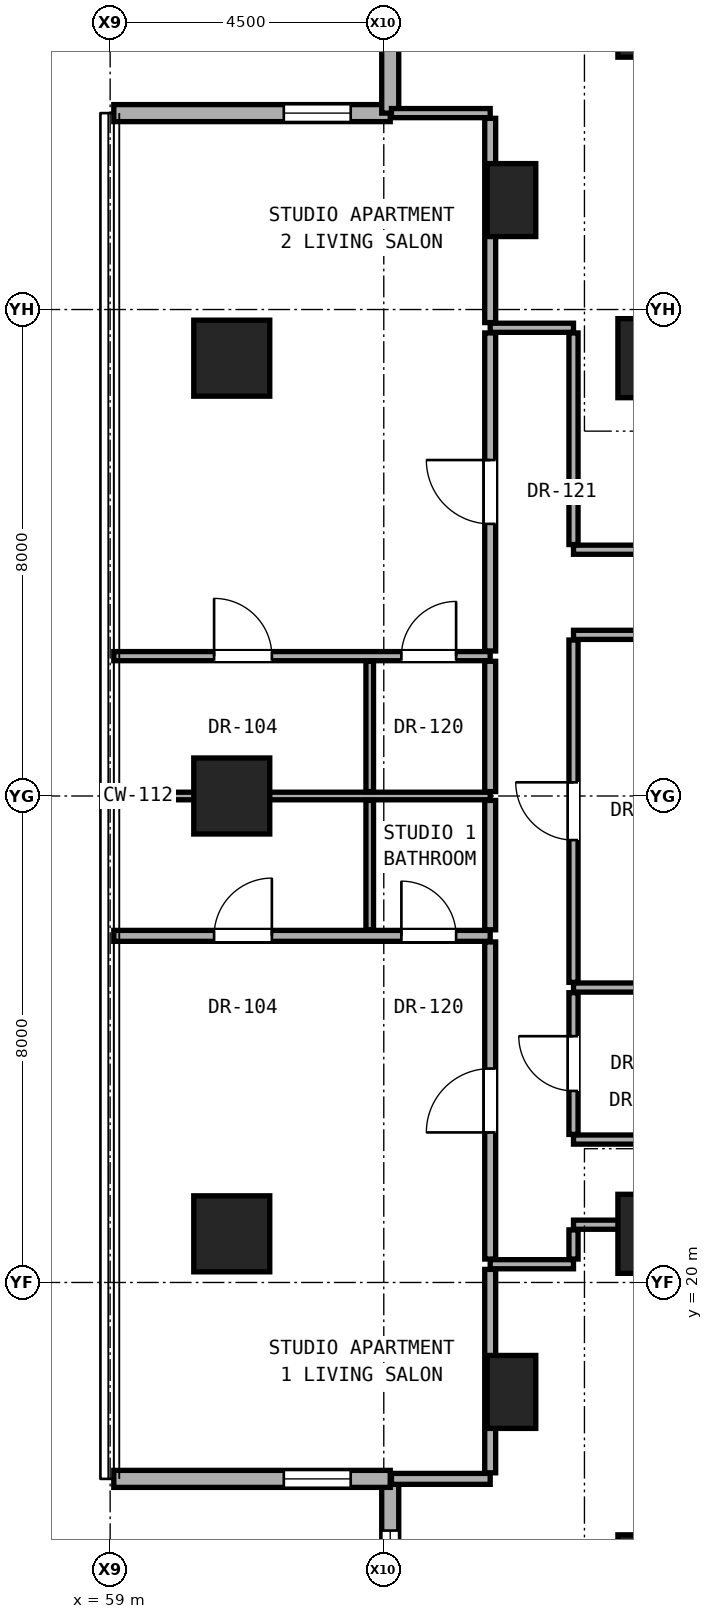
"""IFC4 building model, lengths in metres.
Left out: names, types, materials, properties, quantities, classifications, styles, units other than length and angle.
Written with IfcOpenShell. Run it as: python <this file> out.ifc"""

import sys

from ifc_helpers import new_model, si_unit, direction, frame, frame_2d, origin, origin_2d, place, context, subcontext, project, spatial, rectangle, hollow_rectangle, extrude, element, fill, save


model = new_model("IFC4")
c1 = context("Model", 3, precision=1e-05, world=origin(), true_north=direction((0.0, 1.0)))
c2 = subcontext(c1, "Body", "Model", "MODEL_VIEW")
j1 = project(units=[si_unit("LENGTHUNIT", "METRE"), si_unit("PLANEANGLEUNIT", "RADIAN")], contexts=[c1])
p1 = place(None, origin())
s1 = spatial("IfcSite", under=j1, at=p1, CompositionType="ELEMENT")
p2 = place(p1, origin())
s2 = spatial("IfcBuilding", under=s1, at=p2, CompositionType="ELEMENT")
p3 = place(p2, frame((0.0, 0.0, 52.1)))
s3 = spatial("IfcBuildingStorey", under=s2, at=p3, CompositionType="ELEMENT", Elevation=52.1)
for number, where, z_axis, x_axis in (
    (1, (68.0, 15.2, 0.0), (0.0, 0.0, 1.0), (1.0, 0.0, 0.0)),
    (2, (68.0, 20.8, 0.0), (0.0, 0.0, 1.0), (1.0, 0.0, 0.0)),
    (3, (68.0, 35.2, 0.0), (0.0, 0.0, 1.0), (1.0, 0.0, 0.0)),
    (4, (68.0, 40.8, 0.0), (0.0, 0.0, 1.0), (1.0, 0.0, 0.0)),
):
    element("IfcColumn", number, at=place(p3, frame(where, z_axis=z_axis, x_axis=x_axis)), inside=s3, PredefinedType="COLUMN", context=c2, shape_type="SweptSolid", body=[
        extrude(rectangle(XDim=1.3, YDim=1.3, at=origin_2d()), origin(), (0.0, 0.0, 1.0), 3.3),
    ])
for number, where, z_axis, x_axis in (
    (5, (61.0, 20.8, 0.0), (0.0, 0.0, 1.0), (1.0, 0.0, 0.0)),
    (6, (61.0, 28.0, 0.0), (0.0, 0.0, 1.0), (1.0, 0.0, 0.0)),
    (7, (61.0, 35.2, 0.0), (0.0, 0.0, 1.0), (1.0, 0.0, 0.0)),
):
    element("IfcColumn", number, at=place(p3, frame(where, z_axis=z_axis, x_axis=x_axis)), inside=s3, PredefinedType="COLUMN", context=c2, shape_type="SweptSolid", body=[
        extrude(hollow_rectangle(XDim=1.25, YDim=1.25, WallThickness=0.07, at=origin_2d()), origin(), (0.0, 0.0, 1.0), 3.3),
    ])
for number, where, z_axis, x_axis in (
    (8, (65.6, 18.2, 0.0), (0.0, 0.0, 1.0), (1.0, 0.0, 0.0)),
    (9, (65.6, 37.8, 0.0), (0.0, 0.0, 1.0), (1.0, 0.0, 0.0)),
):
    element("IfcColumn", number, at=place(p3, frame(where, z_axis=z_axis, x_axis=x_axis)), inside=s3, PredefinedType="PILASTER", context=c2, shape_type="SweptSolid", body=[
        extrude(rectangle(XDim=0.8, YDim=1.2, at=origin_2d()), origin(), (0.0, 0.0, 1.0), 3.3),
    ])
p4 = place(p3, frame((63.606, 16.77, 0.0), z_axis=(0.0, 0.0, 1.0), x_axis=(0.0, -1.0, 0.0)))
e10 = element("IfcWall", 10, at=p4, inside=s3, PredefinedType="SOLIDWALL", context=c2, shape_type="SweptSolid", body=[
    extrude(rectangle(XDim=4.546, YDim=0.28, at=frame_2d((2.273, 0.0))), origin(), (0.0, 0.0, 1.0), 3.04),
])
p5 = place(p4, frame((0.85, 0.0, 0.79)))
e11 = element("IfcOpeningElement", 11, at=p5, cuts=e10, PredefinedType="OPENING", context=c2, shape_type="SweptSolid", body=[
    extrude(rectangle(XDim=1.2, YDim=2.1, at=frame_2d((0.6, 1.05))), frame((0.0, 0.15, 0.0), z_axis=(0.0, -1.0, 0.0), x_axis=(1.0, 0.0, 0.0)), (0.0, 0.0, 1.0), 0.3),
])
p6 = place(p3, frame((59.06, 16.77, 0.0), z_axis=(0.0, 0.0, 1.0), x_axis=(1.0, 0.0, 0.0)))
e12 = element("IfcWall", 12, at=p6, inside=s3, PredefinedType="SOLIDWALL", context=c2, shape_type="SweptSolid", body=[
    extrude(rectangle(XDim=4.546, YDim=0.28, at=frame_2d((2.273, 0.0))), origin(), (0.0, 0.0, 1.0), 3.04),
])
p7 = place(p6, frame((2.796, 0.0, 0.85)))
e13 = element("IfcOpeningElement", 13, at=p7, cuts=e12, PredefinedType="OPENING", context=c2, shape_type="SweptSolid", body=[
    extrude(rectangle(XDim=1.1, YDim=2.0, at=frame_2d((0.55, 1.0))), frame((0.0, 0.15, 0.0), z_axis=(0.0, -1.0, 0.0), x_axis=(1.0, 0.0, 0.0)), (0.0, 0.0, 1.0), 0.3),
])
p8 = place(p3, frame((63.606, 39.23, 0.0), z_axis=(0.0, 0.0, 1.0), x_axis=(-1.0, 0.0, 0.0)))
e14 = element("IfcWall", 14, at=p8, inside=s3, PredefinedType="SOLIDWALL", context=c2, shape_type="SweptSolid", body=[
    extrude(rectangle(XDim=4.546, YDim=0.28, at=frame_2d((2.273, 0.0))), origin(), (0.0, 0.0, 1.0), 3.04),
])
p9 = place(p8, frame((0.65, 0.0, 0.85)))
e15 = element("IfcOpeningElement", 15, at=p9, cuts=e14, PredefinedType="OPENING", context=c2, shape_type="SweptSolid", body=[
    extrude(rectangle(XDim=1.1, YDim=2.0, at=frame_2d((0.55, 1.0))), frame((0.0, 0.15, 0.0), z_axis=(0.0, -1.0, 0.0), x_axis=(1.0, 0.0, 0.0)), (0.0, 0.0, 1.0), 0.3),
])
p10 = place(p3, frame((63.606, 43.776, 0.0), z_axis=(0.0, 0.0, 1.0), x_axis=(0.0, -1.0, 0.0)))
e16 = element("IfcWall", 16, at=p10, inside=s3, PredefinedType="SOLIDWALL", context=c2, shape_type="SweptSolid", body=[
    extrude(rectangle(XDim=4.546, YDim=0.28, at=frame_2d((2.273, 0.0))), origin(), (0.0, 0.0, 1.0), 3.04),
])
p11 = place(p3, frame((63.626, 16.77, 0.0), z_axis=(0.0, 0.0, 1.0), x_axis=(1.0, 0.0, 0.0)))
e17 = element("IfcWall", 17, at=p11, inside=s3, PredefinedType="PARTITIONING", context=c2, shape_type="SweptSolid", body=[
    extrude(rectangle(XDim=1.624, YDim=0.18, at=frame_2d((0.812, 0.0))), origin(), (0.0, 0.0, 1.0), 3.06),
])
p12 = place(p3, frame((65.25, 20.3, 0.0), z_axis=(0.0, 0.0, 1.0), x_axis=(1.0, 0.0, 0.0)))
e18 = element("IfcWall", 18, at=p12, inside=s3, PredefinedType="PARTITIONING", context=c2, shape_type="SweptSolid", body=[
    extrude(rectangle(XDim=1.37, YDim=0.15, at=frame_2d((0.685, 0.0))), origin(), (0.0, 0.0, 1.0), 3.06),
])
p13 = place(p3, frame((66.62, 20.95, 0.0), z_axis=(0.0, 0.0, 1.0), x_axis=(1.0, 0.0, 0.0)))
e19 = element("IfcWall", 19, at=p13, inside=s3, PredefinedType="PARTITIONING", context=c2, shape_type="SweptSolid", body=[
    extrude(rectangle(XDim=1.06, YDim=0.15, at=frame_2d((0.53, 0.0))), origin(), (0.0, 0.0, 1.0), 2.452),
])
p14 = place(p3, frame((66.62, 22.35, 0.0), z_axis=(0.0, 0.0, 1.0), x_axis=(1.0, 0.0, 0.0)))
e20 = element("IfcWall", 20, at=p14, inside=s3, PredefinedType="PARTITIONING", context=c2, shape_type="SweptSolid", body=[
    extrude(rectangle(XDim=19.63, YDim=0.15, at=frame_2d((9.815, 0.0))), origin(), (0.0, 0.0, 1.0), 2.125),
])
p15 = place(p14, frame((8.129, 0.0, 0.0)))
e21 = element("IfcOpeningElement", 21, at=p15, cuts=e20, PredefinedType="OPENING", context=c2, shape_type="SweptSolid", body=[
    extrude(rectangle(XDim=0.85, YDim=2.01, at=frame_2d((0.425, 1.005))), frame((0.0, 0.085, 0.0), z_axis=(0.0, -1.0, 0.0), x_axis=(1.0, 0.0, 0.0)), (0.0, 0.0, 1.0), 0.17),
])
p16 = place(p3, frame((66.62, 24.85, 0.0), z_axis=(0.0, 0.0, 1.0), x_axis=(1.0, 0.0, 0.0)))
e22 = element("IfcWall", 22, at=p16, inside=s3, PredefinedType="PARTITIONING", context=c2, shape_type="SweptSolid", body=[
    extrude(rectangle(XDim=3.13, YDim=0.15, at=frame_2d((1.565, 0.0))), origin(), (0.0, 0.0, 1.0), 2.125),
])
p17 = place(p3, frame((59.06, 25.7, 0.0), z_axis=(0.0, 0.0, 1.0), x_axis=(1.0, 0.0, 0.0)))
e23 = element("IfcWall", 23, at=p17, inside=s3, PredefinedType="PARTITIONING", context=c2, shape_type="SweptSolid", body=[
    extrude(rectangle(XDim=6.19, YDim=0.18, at=frame_2d((3.095, 0.0))), origin(), (0.0, 0.0, 1.0), 2.196),
])
p18 = place(p17, frame((1.649, 0.0, 0.0)))
e24 = element("IfcOpeningElement", 24, at=p18, cuts=e23, PredefinedType="OPENING", context=c2, shape_type="SweptSolid", body=[
    extrude(rectangle(XDim=0.95, YDim=2.15, at=frame_2d((0.475, 1.075))), frame((0.0, 0.1, 0.0), z_axis=(0.0, -1.0, 0.0), x_axis=(1.0, 0.0, 0.0)), (0.0, 0.0, 1.0), 0.2),
])
p19 = place(p17, frame((4.729, 0.0, 0.0)))
e25 = element("IfcOpeningElement", 25, at=p19, cuts=e23, PredefinedType="OPENING", context=c2, shape_type="SweptSolid", body=[
    extrude(rectangle(XDim=0.9, YDim=2.1, at=frame_2d((0.45, 1.05))), frame((0.0, 0.1, 0.0), z_axis=(0.0, -1.0, 0.0), x_axis=(1.0, 0.0, 0.0)), (0.0, 0.0, 1.0), 0.2),
])
p20 = place(p3, frame((59.06, 28.0, 0.0), z_axis=(0.0, 0.0, 1.0), x_axis=(1.0, 0.0, 0.0)))
e26 = element("IfcWall", 26, at=p20, inside=s3, PredefinedType="PARTITIONING", context=c2, shape_type="SweptSolid", body=[
    extrude(rectangle(XDim=6.19, YDim=0.125, at=frame_2d((3.095, 0.0))), origin(), (0.0, 0.0, 1.0), 2.196),
])
p21 = place(p3, frame((59.06, 30.3, 0.0), z_axis=(0.0, 0.0, 1.0), x_axis=(1.0, 0.0, 0.0)))
e27 = element("IfcWall", 27, at=p21, inside=s3, PredefinedType="PARTITIONING", context=c2, shape_type="SweptSolid", body=[
    extrude(rectangle(XDim=6.19, YDim=0.15, at=frame_2d((3.095, 0.0))), origin(), (0.0, 0.0, 1.0), 2.196),
])
p22 = place(p21, frame((1.649, 0.0, 0.0)))
e28 = element("IfcOpeningElement", 28, at=p22, cuts=e27, PredefinedType="OPENING", context=c2, shape_type="SweptSolid", body=[
    extrude(rectangle(XDim=0.95, YDim=2.15, at=frame_2d((0.475, 1.075))), frame((0.0, 0.085, 0.0), z_axis=(0.0, -1.0, 0.0), x_axis=(1.0, 0.0, 0.0)), (0.0, 0.0, 1.0), 0.17),
])
p23 = place(p21, frame((4.729, 0.0, 0.0)))
e29 = element("IfcOpeningElement", 29, at=p23, cuts=e27, PredefinedType="OPENING", context=c2, shape_type="SweptSolid", body=[
    extrude(rectangle(XDim=0.9, YDim=2.1, at=frame_2d((0.45, 1.05))), frame((0.0, 0.085, 0.0), z_axis=(0.0, -1.0, 0.0), x_axis=(1.0, 0.0, 0.0)), (0.0, 0.0, 1.0), 0.17),
])
p24 = place(p3, frame((66.62, 30.65, 0.0), z_axis=(0.0, 0.0, 1.0), x_axis=(1.0, 0.0, 0.0)))
e30 = element("IfcWall", 30, at=p24, inside=s3, PredefinedType="PARTITIONING", context=c2, shape_type="SweptSolid", body=[
    extrude(rectangle(XDim=19.63, YDim=0.15, at=frame_2d((9.815, 0.0))), origin(), (0.0, 0.0, 1.0), 2.125),
])
p25 = place(p24, frame((3.855, 0.0, 0.0)))
e31 = element("IfcOpeningElement", 31, at=p25, cuts=e30, PredefinedType="OPENING", context=c2, shape_type="SweptSolid", body=[
    extrude(rectangle(XDim=0.85, YDim=2.01, at=frame_2d((0.425, 1.005))), frame((0.0, 0.085, 0.0), z_axis=(0.0, -1.0, 0.0), x_axis=(1.0, 0.0, 0.0)), (0.0, 0.0, 1.0), 0.17),
])
p26 = place(p24, frame((15.209, 0.0, 0.0)))
e32 = element("IfcOpeningElement", 32, at=p26, cuts=e30, PredefinedType="OPENING", context=c2, shape_type="SweptSolid", body=[
    extrude(rectangle(XDim=0.85, YDim=2.01, at=frame_2d((0.425, 1.005))), frame((0.0, 0.085, 0.0), z_axis=(0.0, -1.0, 0.0), x_axis=(1.0, 0.0, 0.0)), (0.0, 0.0, 1.0), 0.17),
])
p27 = place(p3, frame((66.62, 32.05, 0.0), z_axis=(0.0, 0.0, 1.0), x_axis=(1.0, 0.0, 0.0)))
e33 = element("IfcWall", 33, at=p27, inside=s3, PredefinedType="PARTITIONING", context=c2, shape_type="SweptSolid", body=[
    extrude(rectangle(XDim=2.18, YDim=0.15, at=frame_2d((1.09, 0.0))), origin(), (0.0, 0.0, 1.0), 2.125),
])
p28 = place(p3, frame((65.25, 35.7, 0.0), z_axis=(0.0, 0.0, 1.0), x_axis=(1.0, 0.0, 0.0)))
e34 = element("IfcWall", 34, at=p28, inside=s3, PredefinedType="PARTITIONING", context=c2, shape_type="SweptSolid", body=[
    extrude(rectangle(XDim=1.37, YDim=0.15, at=frame_2d((0.685, 0.0))), origin(), (0.0, 0.0, 1.0), 3.06),
])
p29 = place(p3, frame((63.626, 39.23, 0.0), z_axis=(0.0, 0.0, 1.0), x_axis=(1.0, 0.0, 0.0)))
e35 = element("IfcWall", 35, at=p29, inside=s3, PredefinedType="PARTITIONING", context=c2, shape_type="SweptSolid", body=[
    extrude(rectangle(XDim=1.624, YDim=0.15, at=frame_2d((0.812, 0.0))), origin(), (0.0, 0.0, 1.0), 3.06),
])
p30 = place(p3, frame((63.269, 25.8, 0.0), z_axis=(0.0, 0.0, 1.0), x_axis=(0.0, 1.0, 0.0)))
e36 = element("IfcWall", 36, at=p30, inside=s3, PredefinedType="PARTITIONING", context=c2, shape_type="SweptSolid", body=[
    extrude(rectangle(XDim=2.127, YDim=0.125, at=frame_2d((1.064, 0.0))), origin(), (0.0, 0.0, 1.0), 2.279),
])
p31 = place(p3, frame((63.269, 28.073, 0.0), z_axis=(0.0, 0.0, 1.0), x_axis=(0.0, 1.0, 0.0)))
e37 = element("IfcWall", 37, at=p31, inside=s3, PredefinedType="PARTITIONING", context=c2, shape_type="SweptSolid", body=[
    extrude(rectangle(XDim=2.143, YDim=0.125, at=frame_2d((1.071, 0.0))), origin(), (0.0, 0.0, 1.0), 2.279),
])
p32 = place(p3, frame((65.25, 16.87, 0.0), z_axis=(0.0, 0.0, 1.0), x_axis=(0.0, 1.0, 0.0)))
e38 = element("IfcWall", 38, at=p32, inside=s3, PredefinedType="PARTITIONING", context=c2, shape_type="SweptSolid", body=[
    extrude(rectangle(XDim=3.345, YDim=0.18, at=frame_2d((1.672, 0.0))), origin(), (0.0, 0.0, 1.0), 2.436),
])
p33 = place(p3, frame((65.25, 20.385, 0.0), z_axis=(0.0, 0.0, 1.0), x_axis=(0.0, 1.0, 0.0)))
e39 = element("IfcWall", 39, at=p33, inside=s3, PredefinedType="PARTITIONING", context=c2, shape_type="SweptSolid", body=[
    extrude(rectangle(XDim=5.215, YDim=0.18, at=frame_2d((2.607, 0.0))), origin(), (0.0, 0.0, 1.0), 2.452),
])
p34 = place(p33, frame((2.083, 0.0, 0.0)))
e40 = element("IfcOpeningElement", 40, at=p34, cuts=e39, PredefinedType="OPENING", context=c2, shape_type="SweptSolid", body=[
    extrude(rectangle(XDim=1.05, YDim=2.2, at=frame_2d((0.525, 1.1))), frame((0.0, 0.1, 0.0), z_axis=(0.0, -1.0, 0.0), x_axis=(1.0, 0.0, 0.0)), (0.0, 0.0, 1.0), 0.2),
])
p35 = place(p3, frame((65.25, 25.8, 0.0), z_axis=(0.0, 0.0, 1.0), x_axis=(0.0, 1.0, 0.0)))
e41 = element("IfcWall", 41, at=p35, inside=s3, PredefinedType="PARTITIONING", context=c2, shape_type="SweptSolid", body=[
    extrude(rectangle(XDim=2.127, YDim=0.18, at=frame_2d((1.064, 0.0))), origin(), (0.0, 0.0, 1.0), 2.279),
])
p36 = place(p3, frame((65.25, 28.073, 0.0), z_axis=(0.0, 0.0, 1.0), x_axis=(0.0, 1.0, 0.0)))
e42 = element("IfcWall", 42, at=p36, inside=s3, PredefinedType="PARTITIONING", context=c2, shape_type="SweptSolid", body=[
    extrude(rectangle(XDim=2.143, YDim=0.18, at=frame_2d((1.071, 0.0))), origin(), (0.0, 0.0, 1.0), 2.279),
])
p37 = place(p3, frame((65.25, 30.385, 0.0), z_axis=(0.0, 0.0, 1.0), x_axis=(0.0, 1.0, 0.0)))
e43 = element("IfcWall", 43, at=p37, inside=s3, PredefinedType="PARTITIONING", context=c2, shape_type="SweptSolid", body=[
    extrude(rectangle(XDim=5.23, YDim=0.18, at=frame_2d((2.615, 0.0))), origin(), (0.0, 0.0, 1.0), 2.452),
])
p38 = place(p37, frame((2.09, 0.0, 0.0)))
e44 = element("IfcOpeningElement", 44, at=p38, cuts=e43, PredefinedType="OPENING", context=c2, shape_type="SweptSolid", body=[
    extrude(rectangle(XDim=1.05, YDim=2.2, at=frame_2d((0.525, 1.1))), frame((0.0, 0.1, 0.0), z_axis=(0.0, -1.0, 0.0), x_axis=(1.0, 0.0, 0.0)), (0.0, 0.0, 1.0), 0.2),
])
p39 = place(p3, frame((65.25, 35.785, 0.0), z_axis=(0.0, 0.0, 1.0), x_axis=(0.0, 1.0, 0.0)))
e45 = element("IfcWall", 45, at=p39, inside=s3, PredefinedType="PARTITIONING", context=c2, shape_type="SweptSolid", body=[
    extrude(rectangle(XDim=3.36, YDim=0.18, at=frame_2d((1.68, 0.0))), origin(), (0.0, 0.0, 1.0), 2.436),
])
p40 = place(p3, frame((66.62, 20.385, 0.0), z_axis=(0.0, 0.0, 1.0), x_axis=(0.0, 1.0, 0.0)))
e46 = element("IfcWall", 46, at=p40, inside=s3, PredefinedType="PARTITIONING", context=c2, shape_type="SweptSolid", body=[
    extrude(rectangle(XDim=0.48, YDim=0.15, at=frame_2d((0.24, 0.0))), origin(), (0.0, 0.0, 1.0), 2.452),
])
p41 = place(p3, frame((66.62, 22.435, 0.0), z_axis=(0.0, 0.0, 1.0), x_axis=(0.0, 1.0, 0.0)))
e47 = element("IfcWall", 47, at=p41, inside=s3, PredefinedType="PARTITIONING", context=c2, shape_type="SweptSolid", body=[
    extrude(rectangle(XDim=2.33, YDim=0.15, at=frame_2d((1.165, 0.0))), origin(), (0.0, 0.0, 1.0), 3.06),
])
p42 = place(p41, frame((0.715, 0.0, 0.0)))
e48 = element("IfcOpeningElement", 48, at=p42, cuts=e47, PredefinedType="OPENING", context=c2, shape_type="SweptSolid", body=[
    extrude(rectangle(XDim=0.9, YDim=2.1, at=frame_2d((0.45, 1.05))), frame((0.0, 0.085, 0.0), z_axis=(0.0, -1.0, 0.0), x_axis=(1.0, 0.0, 0.0)), (0.0, 0.0, 1.0), 0.17),
])
p43 = place(p3, frame((66.62, 24.935, 0.0), z_axis=(0.0, 0.0, 1.0), x_axis=(0.0, 1.0, 0.0)))
e49 = element("IfcWall", 49, at=p43, inside=s3, PredefinedType="PARTITIONING", context=c2, shape_type="SweptSolid", body=[
    extrude(rectangle(XDim=5.63, YDim=0.15, at=frame_2d((2.815, 0.0))), origin(), (0.0, 0.0, 1.0), 2.279),
])
p44 = place(p43, frame((2.34, 0.0, 0.0)))
e50 = element("IfcOpeningElement", 50, at=p44, cuts=e49, PredefinedType="OPENING", context=c2, shape_type="SweptSolid", body=[
    extrude(rectangle(XDim=0.95, YDim=2.15, at=frame_2d((0.475, 1.075))), frame((0.0, 0.085, 0.0), z_axis=(0.0, -1.0, 0.0), x_axis=(1.0, 0.0, 0.0)), (0.0, 0.0, 1.0), 0.17),
])
p45 = place(p3, frame((66.62, 32.135, 0.0), z_axis=(0.0, 0.0, 1.0), x_axis=(0.0, 1.0, 0.0)))
e51 = element("IfcWall", 51, at=p45, inside=s3, PredefinedType="PARTITIONING", context=c2, shape_type="SweptSolid", body=[
    extrude(rectangle(XDim=3.48, YDim=0.15, at=frame_2d((1.74, 0.0))), origin(), (0.0, 0.0, 1.0), 2.452),
])
p46 = place(p5, origin())
e52 = element("IfcWindow", 52, at=p46, inside=s3, PartitioningType="SINGLE_PANEL", PredefinedType="WINDOW", context=c2, shape_type="SweptSolid", body=[
    extrude(rectangle(XDim=1.2, YDim=2.1, at=frame_2d((0.6, 1.05))), frame((0.0, 0.03, 0.0), z_axis=(0.0, -1.0, 0.0), x_axis=(1.0, 0.0, 0.0)), (0.0, 0.0, 1.0), 0.06),
])
fill(e11, e52)
p47 = place(p7, origin())
e53 = element("IfcWindow", 53, at=p47, inside=s3, PartitioningType="SINGLE_PANEL", PredefinedType="WINDOW", context=c2, shape_type="SweptSolid", body=[
    extrude(rectangle(XDim=1.1, YDim=2.0, at=frame_2d((0.55, 1.0))), frame((0.0, 0.03, 0.0), z_axis=(0.0, -1.0, 0.0), x_axis=(1.0, 0.0, 0.0)), (0.0, 0.0, 1.0), 0.06),
])
fill(e13, e53)
p48 = place(p9, origin())
e54 = element("IfcWindow", 54, at=p48, inside=s3, PartitioningType="SINGLE_PANEL", PredefinedType="WINDOW", context=c2, shape_type="SweptSolid", body=[
    extrude(rectangle(XDim=1.1, YDim=2.0, at=frame_2d((0.55, 1.0))), frame((0.0, 0.03, 0.0), z_axis=(0.0, -1.0, 0.0), x_axis=(1.0, 0.0, 0.0)), (0.0, 0.0, 1.0), 0.06),
])
fill(e15, e54)
p49 = place(p42, origin())
e55 = element("IfcDoor", 55, at=p49, inside=s3, OperationType="SINGLE_SWING_RIGHT", PredefinedType="DOOR", context=c2, shape_type="SweptSolid", body=[
    extrude(rectangle(XDim=0.9, YDim=2.1, at=frame_2d((0.45, 1.05))), frame((0.0, 0.025, 0.0), z_axis=(0.0, -1.0, 0.0), x_axis=(1.0, 0.0, 0.0)), (0.0, 0.0, 1.0), 0.05),
])
fill(e48, e55)
p50 = place(p34, origin())
e56 = element("IfcDoor", 56, at=p50, inside=s3, OperationType="SINGLE_SWING_LEFT", PredefinedType="DOOR", context=c2, shape_type="SweptSolid", body=[
    extrude(rectangle(XDim=1.05, YDim=2.2, at=frame_2d((0.525, 1.1))), frame((0.0, 0.025, 0.0), z_axis=(0.0, -1.0, 0.0), x_axis=(1.0, 0.0, 0.0)), (0.0, 0.0, 1.0), 0.05),
])
fill(e40, e56)
p51 = place(p18, origin())
e57 = element("IfcDoor", 57, at=p51, inside=s3, OperationType="SINGLE_SWING_RIGHT", PredefinedType="DOOR", context=c2, shape_type="SweptSolid", body=[
    extrude(rectangle(XDim=0.95, YDim=2.15, at=frame_2d((0.475, 1.075))), frame((0.0, 0.025, 0.0), z_axis=(0.0, -1.0, 0.0), x_axis=(1.0, 0.0, 0.0)), (0.0, 0.0, 1.0), 0.05),
])
fill(e24, e57)
p52 = place(p19, origin())
e58 = element("IfcDoor", 58, at=p52, inside=s3, OperationType="SINGLE_SWING_LEFT", PredefinedType="DOOR", context=c2, shape_type="SweptSolid", body=[
    extrude(rectangle(XDim=0.9, YDim=2.1, at=frame_2d((0.45, 1.05))), frame((0.0, 0.025, 0.0), z_axis=(0.0, -1.0, 0.0), x_axis=(1.0, 0.0, 0.0)), (0.0, 0.0, 1.0), 0.05),
])
fill(e25, e58)
p53 = place(p38, origin())
e59 = element("IfcDoor", 59, at=p53, inside=s3, OperationType="SINGLE_SWING_RIGHT", PredefinedType="DOOR", context=c2, shape_type="SweptSolid", body=[
    extrude(rectangle(XDim=1.05, YDim=2.2, at=frame_2d((0.525, 1.1))), frame((0.0, 0.025, 0.0), z_axis=(0.0, -1.0, 0.0), x_axis=(1.0, 0.0, 0.0)), (0.0, 0.0, 1.0), 0.05),
])
fill(e44, e59)
p54 = place(p22, origin())
e60 = element("IfcDoor", 60, at=p54, inside=s3, OperationType="SINGLE_SWING_LEFT", PredefinedType="DOOR", context=c2, shape_type="SweptSolid", body=[
    extrude(rectangle(XDim=0.95, YDim=2.15, at=frame_2d((0.475, 1.075))), frame((0.0, 0.025, 0.0), z_axis=(0.0, -1.0, 0.0), x_axis=(1.0, 0.0, 0.0)), (0.0, 0.0, 1.0), 0.05),
])
fill(e28, e60)
p55 = place(p23, origin())
e61 = element("IfcDoor", 61, at=p55, inside=s3, OperationType="SINGLE_SWING_RIGHT", PredefinedType="DOOR", context=c2, shape_type="SweptSolid", body=[
    extrude(rectangle(XDim=0.9, YDim=2.1, at=frame_2d((0.45, 1.05))), frame((0.0, 0.025, 0.0), z_axis=(0.0, -1.0, 0.0), x_axis=(1.0, 0.0, 0.0)), (0.0, 0.0, 1.0), 0.05),
])
fill(e29, e61)
p56 = place(p44, origin())
e62 = element("IfcDoor", 62, at=p56, inside=s3, OperationType="SINGLE_SWING_RIGHT", PredefinedType="DOOR", context=c2, shape_type="SweptSolid", body=[
    extrude(rectangle(XDim=0.95, YDim=2.15, at=frame_2d((0.475, 1.075))), frame((0.0, 0.025, 0.0), z_axis=(0.0, -1.0, 0.0), x_axis=(1.0, 0.0, 0.0)), (0.0, 0.0, 1.0), 0.05),
])
fill(e50, e62)
save(model, sys.argv[1])
